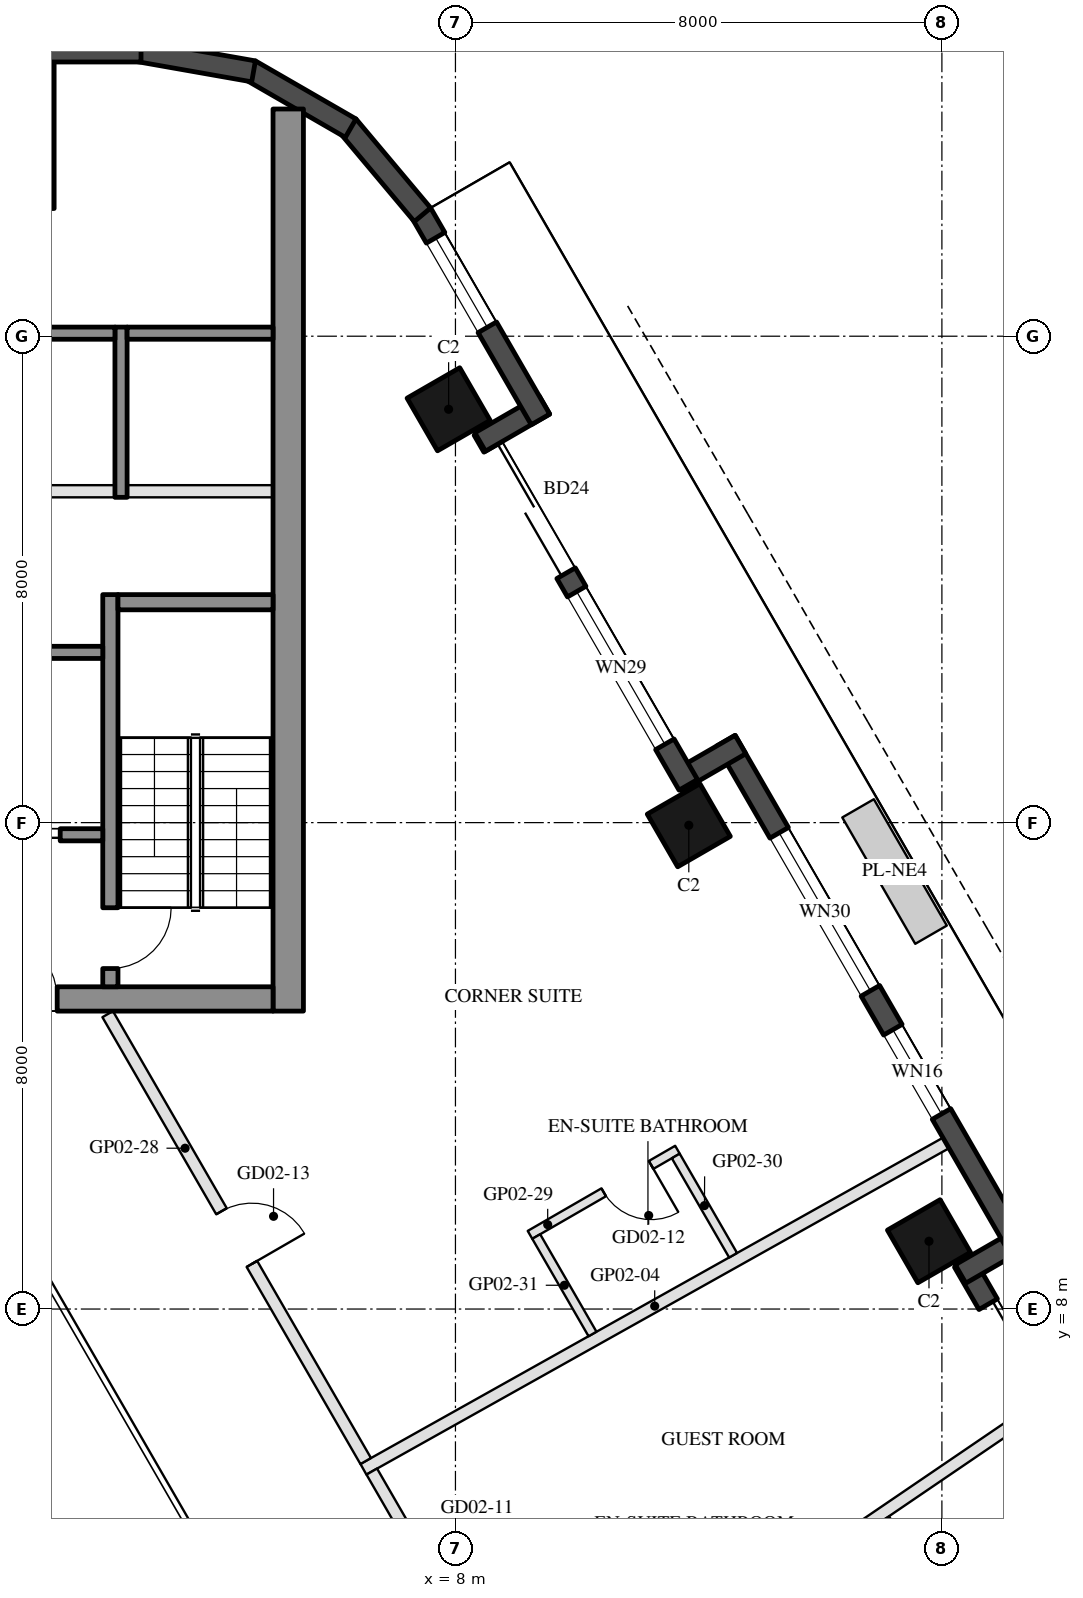
"""IFC4 building model, lengths in metres.
Left out: names, types, materials, properties, quantities, classifications, styles, units other than length and angle.
Written with IfcOpenShell. Run it as: python <this file> out.ifc"""

import sys

from ifc_helpers import new_model, si_unit, direction, frame, frame_2d, origin, origin_2d, place, context, subcontext, project, spatial, rectangle, hollow_rectangle, extrude, element, fill, save


model = new_model("IFC4")
c1 = context("Model", 3, precision=1e-05, world=origin(), true_north=direction((0.0, 1.0)))
c2 = subcontext(c1, "Body", "Model", "MODEL_VIEW")
j1 = project(units=[si_unit("LENGTHUNIT", "METRE"), si_unit("PLANEANGLEUNIT", "RADIAN")], contexts=[c1])
p1 = place(None, origin())
s1 = spatial("IfcSite", under=j1, at=p1, CompositionType="ELEMENT")
p2 = place(p1, origin())
s2 = spatial("IfcBuilding", under=s1, at=p2, CompositionType="ELEMENT")
p3 = place(p2, frame((0.0, 0.0, 53.9)))
s3 = spatial("IfcBuildingStorey", under=s2, at=p3, CompositionType="ELEMENT", Elevation=53.9)
for number, where, z_axis, x_axis in (
    (1, (15.788, 9.115, 0.0), (0.0, 0.0, 1.0), (-0.5, 0.866, 0.0)),
    (2, (11.838, 15.957, 0.0), (0.0, 0.0, 1.0), (-0.5, 0.866, 0.0)),
    (3, (7.888, 22.798, 0.0), (0.0, 0.0, 1.0), (-0.5, 0.866, 0.0)),
):
    element("IfcColumn", number, at=place(p3, frame(where, z_axis=z_axis, x_axis=x_axis)), inside=s3, PredefinedType="COLUMN", context=c2, shape_type="SweptSolid", body=[
        extrude(hollow_rectangle(XDim=1.0, YDim=1.0, WallThickness=0.045, at=origin_2d()), origin(), (0.0, 0.0, 1.0), 3.7),
    ])
p4 = place(p3, frame((0.0, 27.3, 0.0), z_axis=(0.0, 0.0, 1.0), x_axis=(1.0, 0.0, 0.0)))
e4 = element("IfcColumn", 4, at=p4, inside=s3, PredefinedType="COLUMN", context=c2, shape_type="SweptSolid", body=[
    extrude(hollow_rectangle(XDim=2.8, YDim=2.4, WallThickness=0.07, at=origin_2d()), origin(), (0.0, 0.0, 1.0), 3.7),
])
p5 = place(p3, frame((19.729, 2.938, 0.0), z_axis=(0.0, 0.0, 1.0), x_axis=(-0.499976430342, 0.866039011305, 0.0)))
e5 = element("IfcWall", 5, at=p5, inside=s3, PredefinedType="SOLIDWALL", context=c2, shape_type="SweptSolid", body=[
    extrude(rectangle(XDim=6.74, YDim=0.35, at=frame_2d((3.37, 0.0))), origin(), (0.0, 0.0, 1.0), 3.55),
])
p6 = place(p5, frame((0.77, 0.0, 0.3)))
e6 = element("IfcOpeningElement", 6, at=p6, cuts=e5, PredefinedType="OPENING", context=c2, shape_type="SweptSolid", body=[
    extrude(rectangle(XDim=2.8, YDim=2.65, at=frame_2d((1.4, 1.325))), frame((0.0, 0.185, 0.0), z_axis=(0.0, -1.0, 0.0), x_axis=(1.0, 0.0, 0.0)), (0.0, 0.0, 1.0), 0.37),
])
p7 = place(p5, frame((4.536, 0.0, 0.0)))
e7 = element("IfcOpeningElement", 7, at=p7, cuts=e5, PredefinedType="OPENING", context=c2, shape_type="SweptSolid", body=[
    extrude(rectangle(XDim=1.4, YDim=2.4, at=frame_2d((0.7, 1.2))), frame((0.0, 0.185, 0.0), z_axis=(0.0, -1.0, 0.0), x_axis=(1.0, 0.0, 0.0)), (0.0, 0.0, 1.0), 0.37),
])
p8 = place(p3, frame((16.306, 8.577, 0.0), z_axis=(0.0, 0.0, 1.0), x_axis=(0.866092288191, 0.499884134912, 0.0)))
e8 = element("IfcWall", 8, at=p8, inside=s3, PredefinedType="SOLIDWALL", context=c2, shape_type="SweptSolid", body=[
    extrude(rectangle(XDim=1.22, YDim=0.35, at=frame_2d((0.61, 0.0))), origin(), (0.0, 0.0, 1.0), 3.55),
])
p9 = place(p3, frame((17.299, 8.948, 0.0), z_axis=(0.0, 0.0, 1.0), x_axis=(-0.500010041276, 0.866019606374, 0.0)))
e9 = element("IfcWall", 9, at=p9, inside=s3, PredefinedType="SOLIDWALL", context=c2, shape_type="SweptSolid", body=[
    extrude(rectangle(XDim=9.7, YDim=0.35, at=frame_2d((4.85, 0.0))), origin(), (0.0, 0.0, 1.0), 3.55),
])
p10 = place(p9, frame((2.61, 0.0, 0.3)))
e10 = element("IfcOpeningElement", 10, at=p10, cuts=e9, PredefinedType="OPENING", context=c2, shape_type="SweptSolid", body=[
    extrude(rectangle(XDim=1.6, YDim=2.65, at=frame_2d((0.8, 1.325))), frame((0.0, 0.185, 0.0), z_axis=(0.0, -1.0, 0.0), x_axis=(1.0, 0.0, 0.0)), (0.0, 0.0, 1.0), 0.37),
])
p11 = place(p9, frame((4.949, 0.0, 0.3)))
e11 = element("IfcOpeningElement", 11, at=p11, cuts=e9, PredefinedType="OPENING", context=c2, shape_type="SweptSolid", body=[
    extrude(rectangle(XDim=3.0, YDim=2.65, at=frame_2d((1.5, 1.325))), frame((0.0, 0.185, 0.0), z_axis=(0.0, -1.0, 0.0), x_axis=(1.0, 0.0, 0.0)), (0.0, 0.0, 1.0), 0.37),
])
p12 = place(p3, frame((12.688, 17.284, 0.0), z_axis=(0.0, 0.0, 1.0), x_axis=(-0.865955602162, -0.500120880472, 0.0)))
e12 = element("IfcWall", 12, at=p12, inside=s3, PredefinedType="SOLIDWALL", context=c2, shape_type="SweptSolid", body=[
    extrude(rectangle(XDim=1.22, YDim=0.35, at=frame_2d((0.61, 0.0))), origin(), (0.0, 0.0, 1.0), 3.55),
])
p13 = place(p3, frame((11.829, 16.621, 0.0), z_axis=(0.0, 0.0, 1.0), x_axis=(-0.500003597184, 0.866023326939, 0.0)))
e13 = element("IfcWall", 13, at=p13, inside=s3, PredefinedType="SOLIDWALL", context=c2, shape_type="SweptSolid", body=[
    extrude(rectangle(XDim=6.74, YDim=0.35, at=frame_2d((3.37, 0.0))), origin(), (0.0, 0.0, 1.0), 3.55),
])
p14 = place(p13, frame((4.02, 0.0, 0.0)))
e14 = element("IfcOpeningElement", 14, at=p14, cuts=e13, PredefinedType="OPENING", context=c2, shape_type="SweptSolid", body=[
    extrude(rectangle(XDim=2.4, YDim=2.4, at=frame_2d((1.2, 1.2))), frame((0.0, 0.185, 0.0), z_axis=(0.0, -1.0, 0.0), x_axis=(1.0, 0.0, 0.0)), (0.0, 0.0, 1.0), 0.37),
])
p15 = place(p13, frame((0.77, 0.0, 0.3)))
e15 = element("IfcOpeningElement", 15, at=p15, cuts=e13, PredefinedType="OPENING", context=c2, shape_type="SweptSolid", body=[
    extrude(rectangle(XDim=2.9, YDim=2.65, at=frame_2d((1.45, 1.325))), frame((0.0, 0.185, 0.0), z_axis=(0.0, -1.0, 0.0), x_axis=(1.0, 0.0, 0.0)), (0.0, 0.0, 1.0), 0.37),
])
p16 = place(p3, frame((8.406, 22.26, 0.0), z_axis=(0.0, 0.0, 1.0), x_axis=(0.865955602162, 0.500120880472, 0.0)))
e16 = element("IfcWall", 16, at=p16, inside=s3, PredefinedType="SOLIDWALL", context=c2, shape_type="SweptSolid", body=[
    extrude(rectangle(XDim=1.22, YDim=0.35, at=frame_2d((0.61, 0.0))), origin(), (0.0, 0.0, 1.0), 3.55),
])
p17 = place(p3, frame((9.398, 22.631, 0.0), z_axis=(0.0, 0.0, 1.0), x_axis=(-0.499954521343, 0.866051659307, 0.0)))
e17 = element("IfcWall", 17, at=p17, inside=s3, PredefinedType="SOLIDWALL", context=c2, shape_type="SweptSolid", body=[
    extrude(rectangle(XDim=3.916, YDim=0.35, at=frame_2d((1.958, 0.0))), origin(), (0.0, 0.0, 1.0), 3.55),
])
p18 = place(p17, frame((1.75, 0.0, 0.3)))
e18 = element("IfcOpeningElement", 18, at=p18, cuts=e17, PredefinedType="OPENING", context=c2, shape_type="SweptSolid", body=[
    extrude(rectangle(XDim=1.7, YDim=2.65, at=frame_2d((0.85, 1.325))), frame((0.0, 0.185, 0.0), z_axis=(0.0, -1.0, 0.0), x_axis=(1.0, 0.0, 0.0)), (0.0, 0.0, 1.0), 0.37),
])
p19 = place(p3, frame((7.458, 25.998, 0.0), z_axis=(0.0, 0.0, 1.0), x_axis=(-0.642808304945, 0.766027077259, 0.0)))
e19 = element("IfcWall", 19, at=p19, inside=s3, PredefinedType="SOLIDWALL", context=c2, shape_type="SweptSolid", body=[
    extrude(rectangle(XDim=1.91, YDim=0.35, at=frame_2d((0.955, 0.0))), origin(), (0.0, 0.0, 1.0), 3.55),
])
for number, where, z_axis, x_axis in (
    (20, (6.277, 27.422, 0.0), (0.0, 0.0, 1.0), (-0.866, 0.5, 0.0)),
    (21, (4.68, 28.356, 0.0), (0.0, 0.0, 1.0), (-0.985, 0.174, 0.0)),
):
    element("IfcWall", number, at=place(p3, frame(where, z_axis=z_axis, x_axis=x_axis)), inside=s3, PredefinedType="SOLIDWALL", context=c2, shape_type="SweptSolid", body=[
        extrude(rectangle(XDim=1.91, YDim=0.35, at=frame_2d((0.955, 0.0))), origin(), (0.0, 0.0, 1.0), 3.55),
    ])
p20 = place(p3, frame((2.829, 28.685, 0.0), z_axis=(0.0, 0.0, 1.0), x_axis=(-1.0, 0.0, 0.0)))
e22 = element("IfcWall", 22, at=p20, inside=s3, PredefinedType="SOLIDWALL", context=c2, shape_type="SweptSolid", body=[
    extrude(rectangle(XDim=5.658, YDim=0.35, at=frame_2d((2.829, 0.0))), origin(), (0.0, 0.0, 1.0), 3.55),
])
p21 = place(p3, frame((5.25, 12.9, 0.0), z_axis=(0.0, 0.0, 1.0), x_axis=(0.0, 1.0, 0.0)))
e23 = element("IfcWall", 23, at=p21, inside=s3, PredefinedType="SHEAR", context=c2, shape_type="SweptSolid", body=[
    extrude(rectangle(XDim=14.837, YDim=0.5, at=frame_2d((7.418, 0.0))), origin(), (0.0, 0.0, 1.0), 3.5),
])
p22 = place(p3, frame((5.0, 13.1, 0.0), z_axis=(0.0, 0.0, 1.0), x_axis=(-1.0, 0.0, 0.0)))
e24 = element("IfcWall", 24, at=p22, inside=s3, PredefinedType="SHEAR", context=c2, shape_type="SweptSolid", body=[
    extrude(rectangle(XDim=10.0, YDim=0.4, at=frame_2d((5.0, 0.0))), origin(), (0.0, 0.0, 1.0), 3.5),
])
p23 = place(p22, frame((3.55, 0.0, 0.0)))
e25 = element("IfcOpeningElement", 25, at=p23, cuts=e24, PredefinedType="OPENING", context=c2, shape_type="SweptSolid", body=[
    extrude(rectangle(XDim=1.1, YDim=2.1, at=frame_2d((0.55, 1.05))), frame((0.0, 0.21, 0.0), z_axis=(0.0, -1.0, 0.0), x_axis=(1.0, 0.0, 0.0)), (0.0, 0.0, 1.0), 0.42),
])
p24 = place(p22, frame((5.85, 0.0, 0.0)))
e26 = element("IfcOpeningElement", 26, at=p24, cuts=e24, PredefinedType="OPENING", context=c2, shape_type="SweptSolid", body=[
    extrude(rectangle(XDim=1.4, YDim=2.1, at=frame_2d((0.7, 1.05))), frame((0.0, 0.21, 0.0), z_axis=(0.0, -1.0, 0.0), x_axis=(1.0, 0.0, 0.0)), (0.0, 0.0, 1.0), 0.42),
])
p25 = place(p3, frame((2.325, 13.3, 0.0), z_axis=(0.0, 0.0, 1.0), x_axis=(0.0, 1.0, 0.0)))
e27 = element("IfcWall", 27, at=p25, inside=s3, PredefinedType="SHEAR", context=c2, shape_type="SweptSolid", body=[
    extrude(rectangle(XDim=6.45, YDim=0.25, at=frame_2d((3.225, 0.0))), origin(), (0.0, 0.0, 1.0), 3.5),
])
p26 = place(p25, frame((0.3, 0.0, 0.0)))
e28 = element("IfcOpeningElement", 28, at=p26, cuts=e27, PredefinedType="OPENING", context=c2, shape_type="SweptSolid", body=[
    extrude(rectangle(XDim=1.0, YDim=2.1, at=frame_2d((0.5, 1.05))), frame((0.0, 0.135, 0.0), z_axis=(0.0, -1.0, 0.0), x_axis=(1.0, 0.0, 0.0)), (0.0, 0.0, 1.0), 0.27),
])
p27 = place(p3, frame((5.0, 19.625, 0.0), z_axis=(0.0, 0.0, 1.0), x_axis=(-1.0, 0.0, 0.0)))
e29 = element("IfcWall", 29, at=p27, inside=s3, PredefinedType="SHEAR", context=c2, shape_type="SweptSolid", body=[
    extrude(rectangle(XDim=2.55, YDim=0.25, at=frame_2d((1.275, 0.0))), origin(), (0.0, 0.0, 1.0), 3.5),
])
p28 = place(p3, frame((2.2, 18.8, 0.0), z_axis=(0.0, 0.0, 1.0), x_axis=(-1.0, 0.0, 0.0)))
e30 = element("IfcWall", 30, at=p28, inside=s3, PredefinedType="SHEAR", context=c2, shape_type="SweptSolid", body=[
    extrude(rectangle(XDim=2.8, YDim=0.2, at=frame_2d((1.4, 0.0))), origin(), (0.0, 0.0, 1.0), 3.5),
])
p29 = place(p3, frame((2.2, 15.8, 0.0), z_axis=(0.0, 0.0, 1.0), x_axis=(-1.0, 0.0, 0.0)))
e31 = element("IfcWall", 31, at=p29, inside=s3, PredefinedType="SHEAR", context=c2, shape_type="SweptSolid", body=[
    extrude(rectangle(XDim=2.8, YDim=0.2, at=frame_2d((1.4, 0.0))), origin(), (0.0, 0.0, 1.0), 3.5),
])
p30 = place(p29, frame((0.7, 0.0, 0.0)))
e32 = element("IfcOpeningElement", 32, at=p30, cuts=e31, PredefinedType="OPENING", context=c2, shape_type="SweptSolid", body=[
    extrude(rectangle(XDim=1.2, YDim=2.1, at=frame_2d((0.6, 1.05))), frame((0.0, 0.11, 0.0), z_axis=(0.0, -1.0, 0.0), x_axis=(1.0, 0.0, 0.0)), (0.0, 0.0, 1.0), 0.22),
])
p31 = place(p3, frame((2.5, 21.35, 0.0), z_axis=(0.0, 0.0, 1.0), x_axis=(0.0, 1.0, 0.0)))
e33 = element("IfcWall", 33, at=p31, inside=s3, PredefinedType="SHEAR", context=c2, shape_type="SweptSolid", body=[
    extrude(rectangle(XDim=2.8, YDim=0.2, at=frame_2d((1.4, 0.0))), origin(), (0.0, 0.0, 1.0), 3.5),
])
p32 = place(p3, frame((5.0, 24.05, 0.0), z_axis=(0.0, 0.0, 1.0), x_axis=(-1.0, 0.0, 0.0)))
e34 = element("IfcWall", 34, at=p32, inside=s3, PredefinedType="SHEAR", context=c2, shape_type="SweptSolid", body=[
    extrude(rectangle(XDim=2.4, YDim=0.2, at=frame_2d((1.2, 0.0))), origin(), (0.0, 0.0, 1.0), 3.5),
])
p33 = place(p3, frame((2.4, 24.05, 0.0), z_axis=(0.0, 0.0, 1.0), x_axis=(-1.0, 0.0, 0.0)))
e35 = element("IfcWall", 35, at=p33, inside=s3, PredefinedType="SHEAR", context=c2, shape_type="SweptSolid", body=[
    extrude(rectangle(XDim=2.8, YDim=0.2, at=frame_2d((1.4, 0.0))), origin(), (0.0, 0.0, 1.0), 3.5),
])
p34 = place(p3, frame((5.0, 21.45, 0.0), z_axis=(0.0, 0.0, 1.0), x_axis=(-1.0, 0.0, 0.0)))
e36 = element("IfcWall", 36, at=p34, inside=s3, PredefinedType="PARTITIONING", context=c2, shape_type="SweptSolid", body=[
    extrude(rectangle(XDim=2.4, YDim=0.2, at=frame_2d((1.2, 0.0))), origin(), (0.0, 0.0, 1.0), 3.5),
])
p35 = place(p3, frame((2.4, 21.45, 0.0), z_axis=(0.0, 0.0, 1.0), x_axis=(-1.0, 0.0, 0.0)))
e37 = element("IfcWall", 37, at=p35, inside=s3, PredefinedType="PARTITIONING", context=c2, shape_type="SweptSolid", body=[
    extrude(rectangle(XDim=2.8, YDim=0.2, at=frame_2d((1.4, 0.0))), origin(), (0.0, 0.0, 1.0), 3.5),
])
p36 = place(p3, frame((17.551, 6.361, 0.0), z_axis=(0.0, 0.0, 1.0), x_axis=(-0.826656859261, -0.562706350627, 0.0)))
e38 = element("IfcWall", 38, at=p36, inside=s3, PredefinedType="PARTITIONING", context=c2, shape_type="SweptSolid", body=[
    extrude(rectangle(XDim=10.108, YDim=0.2, at=frame_2d((5.054, 0.0))), origin(), (0.0, 0.0, 1.0), 2.95),
])
p37 = place(p3, frame((16.067, 10.731, 0.0), z_axis=(0.0, 0.0, 1.0), x_axis=(-0.872443451626, -0.488715074164, 0.0)))
e39 = element("IfcWall", 39, at=p37, inside=s3, PredefinedType="PARTITIONING", context=c2, shape_type="SweptSolid", body=[
    extrude(rectangle(XDim=10.981, YDim=0.2, at=frame_2d((5.49, 0.0))), origin(), (0.0, 0.0, 1.0), 2.96),
])
p38 = place(p3, frame((16.095, 2.773, 0.0), z_axis=(0.0, 0.0, 1.0), x_axis=(-0.499990189338, 0.866031067899, 0.0)))
e40 = element("IfcWall", 40, at=p38, inside=s3, PredefinedType="PARTITIONING", context=c2, shape_type="SweptSolid", body=[
    extrude(rectangle(XDim=2.052, YDim=0.15, at=frame_2d((1.026, 0.0))), origin(), (0.0, 0.0, 1.0), 2.95),
])
p39 = place(p3, frame((6.624, 5.327, 0.0), z_axis=(0.0, 0.0, 1.0), x_axis=(0.500015953014, -0.866016193112, 0.0)))
e41 = element("IfcWall", 41, at=p39, inside=s3, PredefinedType="PARTITIONING", context=c2, shape_type="SweptSolid", body=[
    extrude(rectangle(XDim=5.208, YDim=0.2, at=frame_2d((2.604, 0.0))), origin(), (0.0, 0.0, 1.0), 2.95),
])
p40 = place(p39, frame((1.751, 0.0, 0.0)))
e42 = element("IfcOpeningElement", 42, at=p40, cuts=e41, PredefinedType="OPENING", context=c2, shape_type="SweptSolid", body=[
    extrude(rectangle(XDim=1.0, YDim=2.1, at=frame_2d((0.5, 1.05))), frame((0.0, 0.11, 0.0), z_axis=(0.0, -1.0, 0.0), x_axis=(1.0, 0.0, 0.0)), (0.0, 0.0, 1.0), 0.22),
])
p41 = place(p3, frame((2.281, 12.85, 0.0), z_axis=(0.0, 0.0, 1.0), x_axis=(0.499997198377, -0.866027021296, 0.0)))
e43 = element("IfcWall", 43, at=p41, inside=s3, PredefinedType="PARTITIONING", context=c2, shape_type="SweptSolid", body=[
    extrude(rectangle(XDim=8.487, YDim=0.2, at=frame_2d((4.243, 0.0))), origin(), (0.0, 0.0, 1.0), 2.95),
])
p42 = place(p41, frame((3.743, 0.0, 0.0)))
e44 = element("IfcOpeningElement", 44, at=p42, cuts=e43, PredefinedType="OPENING", context=c2, shape_type="SweptSolid", body=[
    extrude(rectangle(XDim=1.0, YDim=2.1, at=frame_2d((0.5, 1.05))), frame((0.0, 0.11, 0.0), z_axis=(0.0, -1.0, 0.0), x_axis=(1.0, 0.0, 0.0)), (0.0, 0.0, 1.0), 0.22),
])
p43 = place(p3, frame((11.651, 10.62, 0.0), z_axis=(0.0, 0.0, 1.0), x_axis=(-0.865996816683, -0.500049511043, 0.0)))
e45 = element("IfcWall", 45, at=p43, inside=s3, PredefinedType="PARTITIONING", context=c2, shape_type="SweptSolid", body=[
    extrude(rectangle(XDim=2.8, YDim=0.15, at=frame_2d((1.4, 0.0))), origin(), (0.0, 0.0, 1.0), 3.55),
])
p44 = place(p43, frame((0.5, 0.0, 0.0)))
e46 = element("IfcOpeningElement", 46, at=p44, cuts=e45, PredefinedType="OPENING", context=c2, shape_type="SweptSolid", body=[
    extrude(rectangle(XDim=0.9, YDim=2.1, at=frame_2d((0.45, 1.05))), frame((0.0, 0.085, 0.0), z_axis=(0.0, -1.0, 0.0), x_axis=(1.0, 0.0, 0.0)), (0.0, 0.0, 1.0), 0.17),
])
p45 = place(p3, frame((12.566, 8.885, 0.0), z_axis=(0.0, 0.0, 1.0), x_axis=(-0.499969057507, 0.866043267704, 0.0)))
e47 = element("IfcWall", 47, at=p45, inside=s3, PredefinedType="PARTITIONING", context=c2, shape_type="SweptSolid", body=[
    extrude(rectangle(XDim=1.885, YDim=0.15, at=frame_2d((0.943, 0.0))), origin(), (0.0, 0.0, 1.0), 3.55),
])
p46 = place(p3, frame((10.254, 7.59, 0.0), z_axis=(0.0, 0.0, 1.0), x_axis=(-0.499912756669, 0.866075767886, 0.0)))
e48 = element("IfcWall", 48, at=p46, inside=s3, PredefinedType="PARTITIONING", context=c2, shape_type="SweptSolid", body=[
    extrude(rectangle(XDim=1.851, YDim=0.15, at=frame_2d((0.925, 0.0))), origin(), (0.0, 0.0, 1.0), 3.55),
])
p47 = place(p7, frame((1.4, 0.0, 0.0), z_axis=(0.0, 0.0, 1.0), x_axis=(-1.0, 0.0, 0.0)))
e49 = element("IfcDoor", 49, at=p47, inside=s3, OperationType="SLIDING_TO_LEFT", PredefinedType="DOOR", context=c2, shape_type="SweptSolid", body=[
    extrude(rectangle(XDim=1.4, YDim=2.4, at=frame_2d((0.7, 1.2))), frame((0.0, 0.025, 0.0), z_axis=(0.0, -1.0, 0.0), x_axis=(1.0, 0.0, 0.0)), (0.0, 0.0, 1.0), 0.05),
])
fill(e7, e49)
p48 = place(p10, origin())
e50 = element("IfcWindow", 50, at=p48, inside=s3, PartitioningType="SINGLE_PANEL", PredefinedType="WINDOW", context=c2, shape_type="SweptSolid", body=[
    extrude(rectangle(XDim=1.6, YDim=2.65, at=frame_2d((0.8, 1.325))), frame((0.0, 0.03, 0.0), z_axis=(0.0, -1.0, 0.0), x_axis=(1.0, 0.0, 0.0)), (0.0, 0.0, 1.0), 0.06),
])
fill(e10, e50)
p49 = place(p11, origin())
e51 = element("IfcWindow", 51, at=p49, inside=s3, PartitioningType="SINGLE_PANEL", PredefinedType="WINDOW", context=c2, shape_type="SweptSolid", body=[
    extrude(rectangle(XDim=3.0, YDim=2.65, at=frame_2d((1.5, 1.325))), frame((0.0, 0.03, 0.0), z_axis=(0.0, -1.0, 0.0), x_axis=(1.0, 0.0, 0.0)), (0.0, 0.0, 1.0), 0.06),
])
fill(e11, e51)
p50 = place(p14, frame((2.4, 0.0, 0.0), z_axis=(0.0, 0.0, 1.0), x_axis=(-1.0, 0.0, 0.0)))
e52 = element("IfcDoor", 52, at=p50, inside=s3, OperationType="SLIDING_TO_LEFT", PredefinedType="DOOR", context=c2, shape_type="SweptSolid", body=[
    extrude(rectangle(XDim=2.4, YDim=2.4, at=frame_2d((1.2, 1.2))), frame((0.0, 0.025, 0.0), z_axis=(0.0, -1.0, 0.0), x_axis=(1.0, 0.0, 0.0)), (0.0, 0.0, 1.0), 0.05),
])
fill(e14, e52)
p51 = place(p15, origin())
e53 = element("IfcWindow", 53, at=p51, inside=s3, PartitioningType="SINGLE_PANEL", PredefinedType="WINDOW", context=c2, shape_type="SweptSolid", body=[
    extrude(rectangle(XDim=2.9, YDim=2.65, at=frame_2d((1.45, 1.325))), frame((0.0, 0.03, 0.0), z_axis=(0.0, -1.0, 0.0), x_axis=(1.0, 0.0, 0.0)), (0.0, 0.0, 1.0), 0.06),
])
fill(e15, e53)
p52 = place(p18, origin())
e54 = element("IfcWindow", 54, at=p52, inside=s3, PartitioningType="SINGLE_PANEL", PredefinedType="WINDOW", context=c2, shape_type="SweptSolid", body=[
    extrude(rectangle(XDim=1.7, YDim=2.65, at=frame_2d((0.85, 1.325))), frame((0.0, 0.03, 0.0), z_axis=(0.0, -1.0, 0.0), x_axis=(1.0, 0.0, 0.0)), (0.0, 0.0, 1.0), 0.06),
])
fill(e18, e54)
p53 = place(p30, origin())
e55 = element("IfcDoor", 55, at=p53, inside=s3, OperationType="DOUBLE_DOOR_SLIDING", PredefinedType="DOOR", context=c2, shape_type="SweptSolid", body=[
    extrude(rectangle(XDim=1.2, YDim=2.1, at=frame_2d((0.6, 1.05))), frame((0.0, 0.025, 0.0), z_axis=(0.0, -1.0, 0.0), x_axis=(1.0, 0.0, 0.0)), (0.0, 0.0, 1.0), 0.05),
])
fill(e32, e55)
p54 = place(p23, frame((1.1, 0.0, 0.0), z_axis=(0.0, 0.0, 1.0), x_axis=(-1.0, 0.0, 0.0)))
e56 = element("IfcDoor", 56, at=p54, inside=s3, OperationType="SINGLE_SWING_LEFT", PredefinedType="DOOR", context=c2, shape_type="SweptSolid", body=[
    extrude(rectangle(XDim=1.1, YDim=2.1, at=frame_2d((0.55, 1.05))), frame((0.0, 0.025, 0.0), z_axis=(0.0, -1.0, 0.0), x_axis=(1.0, 0.0, 0.0)), (0.0, 0.0, 1.0), 0.05),
])
fill(e25, e56)
p55 = place(p26, frame((1.0, 0.0, 0.0), z_axis=(0.0, 0.0, 1.0), x_axis=(-1.0, 0.0, 0.0)))
e57 = element("IfcDoor", 57, at=p55, inside=s3, OperationType="SINGLE_SWING_LEFT", PredefinedType="DOOR", context=c2, shape_type="SweptSolid", body=[
    extrude(rectangle(XDim=1.0, YDim=2.1, at=frame_2d((0.5, 1.05))), frame((0.0, 0.025, 0.0), z_axis=(0.0, -1.0, 0.0), x_axis=(1.0, 0.0, 0.0)), (0.0, 0.0, 1.0), 0.05),
])
fill(e28, e57)
p56 = place(p44, origin())
e58 = element("IfcDoor", 58, at=p56, inside=s3, OperationType="SINGLE_SWING_LEFT", PredefinedType="DOOR", context=c2, shape_type="SweptSolid", body=[
    extrude(rectangle(XDim=0.9, YDim=2.1, at=frame_2d((0.45, 1.05))), frame((0.0, 0.025, 0.0), z_axis=(0.0, -1.0, 0.0), x_axis=(1.0, 0.0, 0.0)), (0.0, 0.0, 1.0), 0.05),
])
fill(e46, e58)
p57 = place(p42, origin())
e59 = element("IfcDoor", 59, at=p57, inside=s3, OperationType="SINGLE_SWING_RIGHT", PredefinedType="DOOR", context=c2, shape_type="SweptSolid", body=[
    extrude(rectangle(XDim=1.0, YDim=2.1, at=frame_2d((0.5, 1.05))), frame((0.0, 0.025, 0.0), z_axis=(0.0, -1.0, 0.0), x_axis=(1.0, 0.0, 0.0)), (0.0, 0.0, 1.0), 0.05),
])
fill(e44, e59)
save(model, sys.argv[1])
